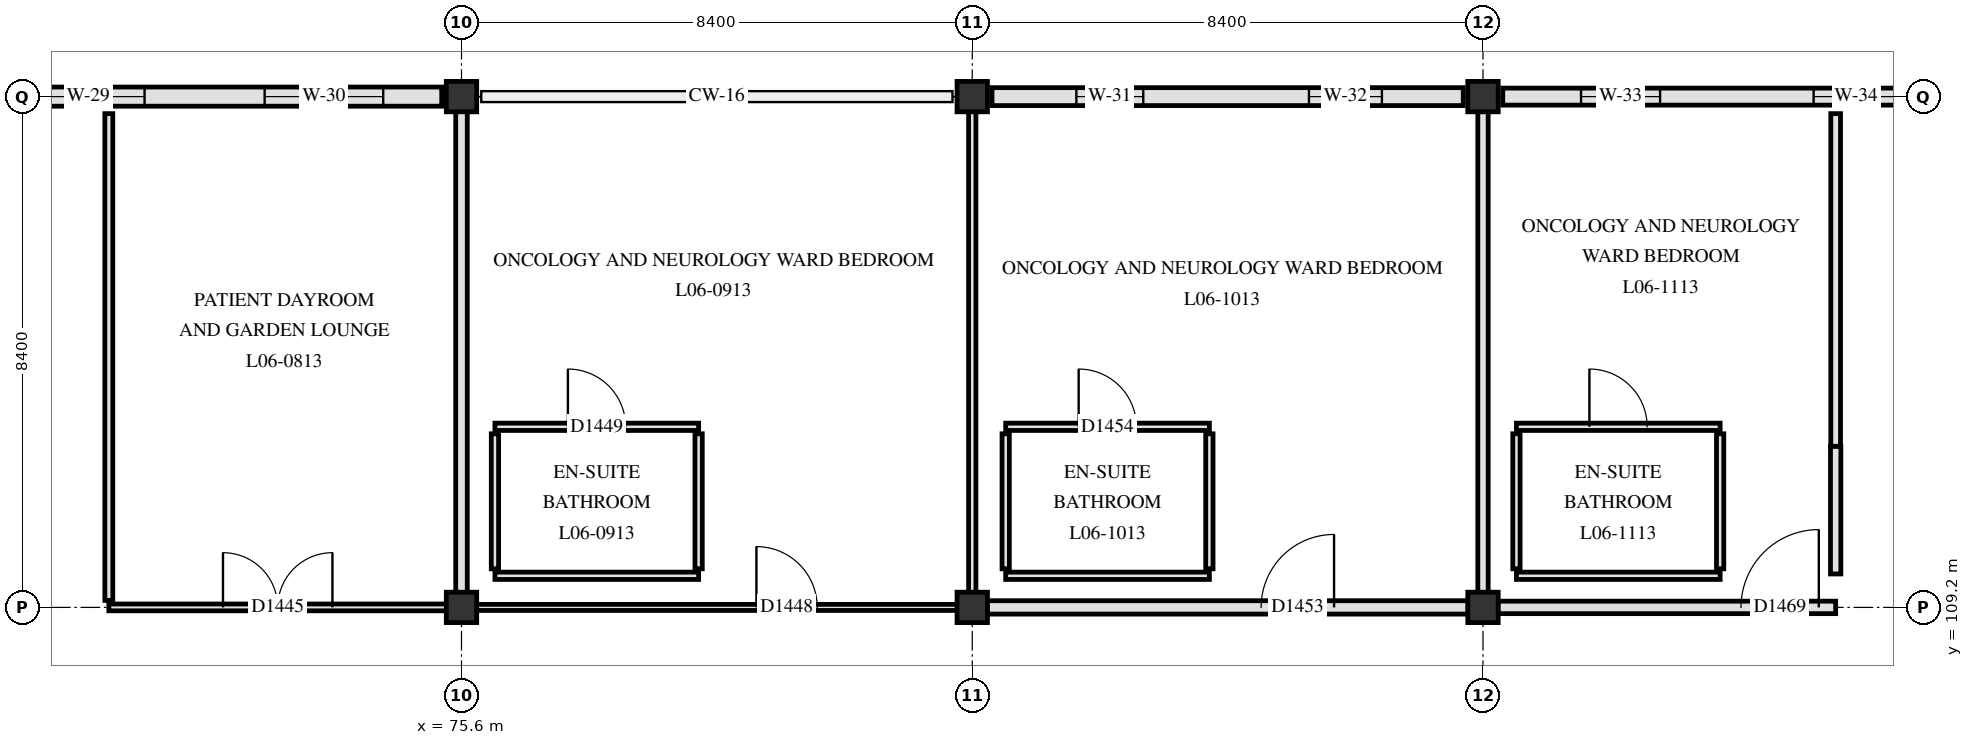
"""IFC4 building model, lengths in metres.
Left out: names, types, materials, properties, quantities, classifications, styles, units other than length and angle.
Written with IfcOpenShell. Run it as: python <this file> out.ifc"""

import sys

from ifc_helpers import new_model, si_unit, direction, frame, frame_2d, origin, origin_2d, place, context, subcontext, project, spatial, rectangle, extrude, element, fill, save


model = new_model("IFC4")
c1 = context("Model", 3, precision=1e-05, world=origin(), true_north=direction((0.0, 1.0)))
c2 = subcontext(c1, "Body", "Model", "MODEL_VIEW")
j1 = project(units=[si_unit("LENGTHUNIT", "METRE"), si_unit("PLANEANGLEUNIT", "RADIAN")], contexts=[c1])
p1 = place(None, origin())
s1 = spatial("IfcSite", under=j1, at=p1, CompositionType="ELEMENT")
p2 = place(p1, origin())
s2 = spatial("IfcBuilding", under=s1, at=p2, CompositionType="ELEMENT")
p3 = place(p2, frame((0.0, 0.0, 26.4)))
s3 = spatial("IfcBuildingStorey", under=s2, at=p3, CompositionType="ELEMENT", Elevation=26.4)
for number, where, z_axis, x_axis in (
    (1, (75.6, 109.2, 0.0), (0.0, 0.0, 1.0), (1.0, 0.0, 0.0)),
    (2, (75.6, 117.6, 0.0), (0.0, 0.0, 1.0), (1.0, 0.0, 0.0)),
    (3, (84.0, 109.2, 0.0), (0.0, 0.0, 1.0), (1.0, 0.0, 0.0)),
    (4, (84.0, 117.6, 0.0), (0.0, 0.0, 1.0), (1.0, 0.0, 0.0)),
    (5, (92.4, 109.2, 0.0), (0.0, 0.0, 1.0), (1.0, 0.0, 0.0)),
    (6, (92.4, 117.6, 0.0), (0.0, 0.0, 1.0), (1.0, 0.0, 0.0)),
):
    element("IfcColumn", number, at=place(p3, frame(where, z_axis=z_axis, x_axis=x_axis)), inside=s3, PredefinedType="COLUMN", context=c2, shape_type="SweptSolid", body=[
        extrude(rectangle(XDim=0.5, YDim=0.5, at=origin_2d()), origin(), (0.0, 0.0, 1.0), 3.9),
    ])
p4 = place(p3, frame((67.525, 117.6, 0.0), z_axis=(0.0, 0.0, 1.0), x_axis=(1.0, 0.0, 0.0)))
e7 = element("IfcWall", 7, at=p4, inside=s3, PredefinedType="SOLIDWALL", context=c2, shape_type="SweptSolid", body=[
    extrude(rectangle(XDim=7.75, YDim=0.315, at=frame_2d((3.875, 0.0))), origin(), (0.0, 0.0, 1.0), 3.36),
])
p5 = place(p4, frame((1.012, 0.0, 0.85)))
e8 = element("IfcOpeningElement", 8, at=p5, cuts=e7, PredefinedType="OPENING", context=c2, shape_type="SweptSolid", body=[
    extrude(rectangle(XDim=1.85, YDim=1.54, at=frame_2d((0.925, 0.77))), frame((0.0, 0.167, 0.0), z_axis=(0.0, -1.0, 0.0), x_axis=(1.0, 0.0, 0.0)), (0.0, 0.0, 1.0), 0.335),
])
p6 = place(p4, frame((4.837, 0.0, 0.85)))
e9 = element("IfcOpeningElement", 9, at=p6, cuts=e7, PredefinedType="OPENING", context=c2, shape_type="SweptSolid", body=[
    extrude(rectangle(XDim=1.95, YDim=1.54, at=frame_2d((0.975, 0.77))), frame((0.0, 0.167, 0.0), z_axis=(0.0, -1.0, 0.0), x_axis=(1.0, 0.0, 0.0)), (0.0, 0.0, 1.0), 0.335),
])
p7 = place(p3, frame((84.325, 117.6, 0.0), z_axis=(0.0, 0.0, 1.0), x_axis=(1.0, 0.0, 0.0)))
e10 = element("IfcWall", 10, at=p7, inside=s3, PredefinedType="SOLIDWALL", context=c2, shape_type="SweptSolid", body=[
    extrude(rectangle(XDim=7.75, YDim=0.295, at=frame_2d((3.875, 0.0))), origin(), (0.0, 0.0, 1.0), 3.36),
])
p8 = place(p7, frame((1.387, 0.0, 0.85)))
e11 = element("IfcOpeningElement", 11, at=p8, cuts=e10, PredefinedType="OPENING", context=c2, shape_type="SweptSolid", body=[
    extrude(rectangle(XDim=1.1, YDim=1.66, at=frame_2d((0.55, 0.83))), frame((0.0, 0.157, 0.0), z_axis=(0.0, -1.0, 0.0), x_axis=(1.0, 0.0, 0.0)), (0.0, 0.0, 1.0), 0.315),
])
p9 = place(p7, frame((5.212, 0.0, 0.85)))
e12 = element("IfcOpeningElement", 12, at=p9, cuts=e10, PredefinedType="OPENING", context=c2, shape_type="SweptSolid", body=[
    extrude(rectangle(XDim=1.2, YDim=1.66, at=frame_2d((0.6, 0.83))), frame((0.0, 0.157, 0.0), z_axis=(0.0, -1.0, 0.0), x_axis=(1.0, 0.0, 0.0)), (0.0, 0.0, 1.0), 0.315),
])
p10 = place(p3, frame((92.725, 117.6, 0.0), z_axis=(0.0, 0.0, 1.0), x_axis=(1.0, 0.0, 0.0)))
e13 = element("IfcWall", 13, at=p10, inside=s3, PredefinedType="SOLIDWALL", context=c2, shape_type="SweptSolid", body=[
    extrude(rectangle(XDim=7.75, YDim=0.28, at=frame_2d((3.875, 0.0))), origin(), (0.0, 0.0, 1.0), 3.36),
])
p11 = place(p10, frame((1.288, 0.0, 0.85)))
e14 = element("IfcOpeningElement", 14, at=p11, cuts=e13, PredefinedType="OPENING", context=c2, shape_type="SweptSolid", body=[
    extrude(rectangle(XDim=1.3, YDim=1.66, at=frame_2d((0.65, 0.83))), frame((0.0, 0.15, 0.0), z_axis=(0.0, -1.0, 0.0), x_axis=(1.0, 0.0, 0.0)), (0.0, 0.0, 1.0), 0.3),
])
p12 = place(p10, frame((5.113, 0.0, 0.85)))
e15 = element("IfcOpeningElement", 15, at=p12, cuts=e13, PredefinedType="OPENING", context=c2, shape_type="SweptSolid", body=[
    extrude(rectangle(XDim=1.4, YDim=1.66, at=frame_2d((0.7, 0.83))), frame((0.0, 0.15, 0.0), z_axis=(0.0, -1.0, 0.0), x_axis=(1.0, 0.0, 0.0)), (0.0, 0.0, 1.0), 0.3),
])
p13 = place(p3, frame((69.8, 109.2, 0.0), z_axis=(0.0, 0.0, 1.0), x_axis=(1.0, 0.0, 0.0)))
e16 = element("IfcWall", 16, at=p13, inside=s3, PredefinedType="PARTITIONING", context=c2, shape_type="SweptSolid", body=[
    extrude(rectangle(XDim=5.555, YDim=0.112, at=frame_2d((2.777, 0.0))), origin(), (0.0, 0.0, 1.0), 3.21),
])
p14 = place(p13, frame((1.877, 0.0, 0.0)))
e17 = element("IfcOpeningElement", 17, at=p14, cuts=e16, PredefinedType="OPENING", context=c2, shape_type="SweptSolid", body=[
    extrude(rectangle(XDim=1.8, YDim=2.25, at=frame_2d((0.9, 1.125))), frame((0.0, 0.066, 0.0), z_axis=(0.0, -1.0, 0.0), x_axis=(1.0, 0.0, 0.0)), (0.0, 0.0, 1.0), 0.132),
])
p15 = place(p3, frame((75.845, 109.2, 0.0), z_axis=(0.0, 0.0, 1.0), x_axis=(1.0, 0.0, 0.0)))
e18 = element("IfcWall", 18, at=p15, inside=s3, PredefinedType="PARTITIONING", context=c2, shape_type="SweptSolid", body=[
    extrude(rectangle(XDim=7.91, YDim=0.1, at=frame_2d((3.955, 0.0))), origin(), (0.0, 0.0, 1.0), 3.21),
])
p16 = place(p15, frame((4.605, 0.0, 0.0)))
e19 = element("IfcOpeningElement", 19, at=p16, cuts=e18, PredefinedType="OPENING", context=c2, shape_type="SweptSolid", body=[
    extrude(rectangle(XDim=1.0, YDim=2.15, at=frame_2d((0.5, 1.075))), frame((0.0, 0.06, 0.0), z_axis=(0.0, -1.0, 0.0), x_axis=(1.0, 0.0, 0.0)), (0.0, 0.0, 1.0), 0.12),
])
p17 = place(p3, frame((84.245, 109.2, 0.0), z_axis=(0.0, 0.0, 1.0), x_axis=(1.0, 0.0, 0.0)))
e20 = element("IfcWall", 20, at=p17, inside=s3, PredefinedType="PARTITIONING", context=c2, shape_type="SweptSolid", body=[
    extrude(rectangle(XDim=7.91, YDim=0.22, at=frame_2d((3.955, 0.0))), origin(), (0.0, 0.0, 1.0), 3.21),
])
p18 = place(p17, frame((4.506, 0.0, 0.0)))
e21 = element("IfcOpeningElement", 21, at=p18, cuts=e20, PredefinedType="OPENING", context=c2, shape_type="SweptSolid", body=[
    extrude(rectangle(XDim=1.2, YDim=2.15, at=frame_2d((0.6, 1.075))), frame((0.0, 0.12, 0.0), z_axis=(0.0, -1.0, 0.0), x_axis=(1.0, 0.0, 0.0)), (0.0, 0.0, 1.0), 0.24),
])
p19 = place(p3, frame((92.645, 109.2, 0.0), z_axis=(0.0, 0.0, 1.0), x_axis=(1.0, 0.0, 0.0)))
e22 = element("IfcWall", 22, at=p19, inside=s3, PredefinedType="PARTITIONING", context=c2, shape_type="SweptSolid", body=[
    extrude(rectangle(XDim=5.555, YDim=0.205, at=frame_2d((2.777, 0.0))), origin(), (0.0, 0.0, 1.0), 3.21),
])
p20 = place(p19, frame((3.998, 0.0, 0.0)))
e23 = element("IfcOpeningElement", 23, at=p20, cuts=e22, PredefinedType="OPENING", context=c2, shape_type="SweptSolid", body=[
    extrude(rectangle(XDim=1.28, YDim=2.18, at=frame_2d((0.64, 1.09))), frame((0.0, 0.113, 0.0), z_axis=(0.0, -1.0, 0.0), x_axis=(1.0, 0.0, 0.0)), (0.0, 0.0, 1.0), 0.225),
])
p21 = place(p3, frame((76.15, 109.72, 0.0), z_axis=(0.0, 0.0, 1.0), x_axis=(1.0, 0.0, 0.0)))
e24 = element("IfcWall", 24, at=p21, inside=s3, PredefinedType="PARTITIONING", context=c2, shape_type="SweptSolid", body=[
    extrude(rectangle(XDim=3.35, YDim=0.12, at=frame_2d((1.675, 0.0))), origin(), (0.0, 0.0, 1.0), 3.61),
])
p22 = place(p3, frame((84.55, 109.72, 0.0), z_axis=(0.0, 0.0, 1.0), x_axis=(1.0, 0.0, 0.0)))
e25 = element("IfcWall", 25, at=p22, inside=s3, PredefinedType="PARTITIONING", context=c2, shape_type="SweptSolid", body=[
    extrude(rectangle(XDim=3.35, YDim=0.12, at=frame_2d((1.675, 0.0))), origin(), (0.0, 0.0, 1.0), 3.61),
])
p23 = place(p3, frame((92.95, 109.72, 0.0), z_axis=(0.0, 0.0, 1.0), x_axis=(1.0, 0.0, 0.0)))
e26 = element("IfcWall", 26, at=p23, inside=s3, PredefinedType="PARTITIONING", context=c2, shape_type="SweptSolid", body=[
    extrude(rectangle(XDim=3.35, YDim=0.12, at=frame_2d((1.675, 0.0))), origin(), (0.0, 0.0, 1.0), 3.61),
])
p24 = place(p3, frame((76.15, 112.17, 0.0), z_axis=(0.0, 0.0, 1.0), x_axis=(1.0, 0.0, 0.0)))
e27 = element("IfcWall", 27, at=p24, inside=s3, PredefinedType="PARTITIONING", context=c2, shape_type="SweptSolid", body=[
    extrude(rectangle(XDim=3.35, YDim=0.12, at=frame_2d((1.675, 0.0))), origin(), (0.0, 0.0, 1.0), 3.61),
])
p25 = place(p24, frame((1.2, 0.0, 0.0)))
e28 = element("IfcOpeningElement", 28, at=p25, cuts=e27, PredefinedType="OPENING", context=c2, shape_type="SweptSolid", body=[
    extrude(rectangle(XDim=0.95, YDim=2.1, at=frame_2d((0.475, 1.05))), frame((0.0, 0.07, 0.0), z_axis=(0.0, -1.0, 0.0), x_axis=(1.0, 0.0, 0.0)), (0.0, 0.0, 1.0), 0.14),
])
p26 = place(p3, frame((84.55, 112.17, 0.0), z_axis=(0.0, 0.0, 1.0), x_axis=(1.0, 0.0, 0.0)))
e29 = element("IfcWall", 29, at=p26, inside=s3, PredefinedType="PARTITIONING", context=c2, shape_type="SweptSolid", body=[
    extrude(rectangle(XDim=3.35, YDim=0.12, at=frame_2d((1.675, 0.0))), origin(), (0.0, 0.0, 1.0), 3.61),
])
p27 = place(p26, frame((1.2, 0.0, 0.0)))
e30 = element("IfcOpeningElement", 30, at=p27, cuts=e29, PredefinedType="OPENING", context=c2, shape_type="SweptSolid", body=[
    extrude(rectangle(XDim=0.95, YDim=2.1, at=frame_2d((0.475, 1.05))), frame((0.0, 0.07, 0.0), z_axis=(0.0, -1.0, 0.0), x_axis=(1.0, 0.0, 0.0)), (0.0, 0.0, 1.0), 0.14),
])
p28 = place(p3, frame((92.95, 112.17, 0.0), z_axis=(0.0, 0.0, 1.0), x_axis=(1.0, 0.0, 0.0)))
e31 = element("IfcWall", 31, at=p28, inside=s3, PredefinedType="PARTITIONING", context=c2, shape_type="SweptSolid", body=[
    extrude(rectangle(XDim=3.35, YDim=0.12, at=frame_2d((1.675, 0.0))), origin(), (0.0, 0.0, 1.0), 3.61),
])
p29 = place(p28, frame((1.2, 0.0, 0.0)))
e32 = element("IfcOpeningElement", 32, at=p29, cuts=e31, PredefinedType="OPENING", context=c2, shape_type="SweptSolid", body=[
    extrude(rectangle(XDim=0.95, YDim=2.1, at=frame_2d((0.475, 1.05))), frame((0.0, 0.07, 0.0), z_axis=(0.0, -1.0, 0.0), x_axis=(1.0, 0.0, 0.0)), (0.0, 0.0, 1.0), 0.14),
])
p30 = place(p3, frame((69.8, 109.315, 0.0), z_axis=(0.0, 0.0, 1.0), x_axis=(0.0, 1.0, 0.0)))
e33 = element("IfcWall", 33, at=p30, inside=s3, PredefinedType="PARTITIONING", context=c2, shape_type="SweptSolid", body=[
    extrude(rectangle(XDim=8.005, YDim=0.13, at=frame_2d((4.002, 0.0))), origin(), (0.0, 0.0, 1.0), 3.34),
])
p31 = place(p3, frame((75.6, 109.445, 0.0), z_axis=(0.0, 0.0, 1.0), x_axis=(0.0, 1.0, 0.0)))
e34 = element("IfcWall", 34, at=p31, inside=s3, PredefinedType="PARTITIONING", context=c2, shape_type="SweptSolid", body=[
    extrude(rectangle(XDim=7.91, YDim=0.19, at=frame_2d((3.955, 0.0))), origin(), (0.0, 0.0, 1.0), 3.21),
])
for number, where, z_axis, x_axis in (
    (35, (76.15, 109.835, 0.0), (0.0, 0.0, 1.0), (0.0, 1.0, 0.0)),
    (36, (79.5, 109.835, 0.0), (0.0, 0.0, 1.0), (0.0, 1.0, 0.0)),
):
    element("IfcWall", number, at=place(p3, frame(where, z_axis=z_axis, x_axis=x_axis)), inside=s3, PredefinedType="PARTITIONING", context=c2, shape_type="SweptSolid", body=[
        extrude(rectangle(XDim=2.22, YDim=0.12, at=frame_2d((1.11, 0.0))), origin(), (0.0, 0.0, 1.0), 3.34),
    ])
p32 = place(p3, frame((84.0, 109.445, 0.0), z_axis=(0.0, 0.0, 1.0), x_axis=(0.0, 1.0, 0.0)))
e37 = element("IfcWall", 37, at=p32, inside=s3, PredefinedType="PARTITIONING", context=c2, shape_type="SweptSolid", body=[
    extrude(rectangle(XDim=7.91, YDim=0.12, at=frame_2d((3.955, 0.0))), origin(), (0.0, 0.0, 1.0), 3.21),
])
for number, where, z_axis, x_axis in (
    (38, (84.55, 109.835, 0.0), (0.0, 0.0, 1.0), (0.0, 1.0, 0.0)),
    (39, (87.9, 109.835, 0.0), (0.0, 0.0, 1.0), (0.0, 1.0, 0.0)),
):
    element("IfcWall", number, at=place(p3, frame(where, z_axis=z_axis, x_axis=x_axis)), inside=s3, PredefinedType="PARTITIONING", context=c2, shape_type="SweptSolid", body=[
        extrude(rectangle(XDim=2.22, YDim=0.12, at=frame_2d((1.11, 0.0))), origin(), (0.0, 0.0, 1.0), 3.34),
    ])
p33 = place(p3, frame((92.4, 109.445, 0.0), z_axis=(0.0, 0.0, 1.0), x_axis=(0.0, 1.0, 0.0)))
e40 = element("IfcWall", 40, at=p33, inside=s3, PredefinedType="PARTITIONING", context=c2, shape_type="SweptSolid", body=[
    extrude(rectangle(XDim=7.91, YDim=0.17, at=frame_2d((3.955, 0.0))), origin(), (0.0, 0.0, 1.0), 3.21),
])
for number, where, z_axis, x_axis in (
    (41, (92.95, 109.835, 0.0), (0.0, 0.0, 1.0), (0.0, 1.0, 0.0)),
    (42, (96.3, 109.835, 0.0), (0.0, 0.0, 1.0), (0.0, 1.0, 0.0)),
):
    element("IfcWall", number, at=place(p3, frame(where, z_axis=z_axis, x_axis=x_axis)), inside=s3, PredefinedType="PARTITIONING", context=c2, shape_type="SweptSolid", body=[
        extrude(rectangle(XDim=2.22, YDim=0.12, at=frame_2d((1.11, 0.0))), origin(), (0.0, 0.0, 1.0), 3.34),
    ])
p34 = place(p3, frame((98.2, 109.75, 0.0), z_axis=(0.0, 0.0, 1.0), x_axis=(0.0, 1.0, 0.0)))
e43 = element("IfcWall", 43, at=p34, inside=s3, PredefinedType="PARTITIONING", context=c2, shape_type="SweptSolid", body=[
    extrude(rectangle(XDim=2.1, YDim=0.17, at=frame_2d((1.05, 0.0))), origin(), (0.0, 0.0, 1.0), 3.61),
])
p35 = place(p3, frame((98.2, 111.85, 0.0), z_axis=(0.0, 0.0, 1.0), x_axis=(0.0, 1.0, 0.0)))
e44 = element("IfcWall", 44, at=p35, inside=s3, PredefinedType="PARTITIONING", context=c2, shape_type="SweptSolid", body=[
    extrude(rectangle(XDim=5.47, YDim=0.16, at=frame_2d((2.735, 0.0))), origin(), (0.0, 0.0, 1.0), 3.34),
])
p36 = place(p5, origin())
e45 = element("IfcWindow", 45, at=p36, inside=s3, PartitioningType="SINGLE_PANEL", PredefinedType="WINDOW", context=c2, shape_type="SweptSolid", body=[
    extrude(rectangle(XDim=1.85, YDim=1.54, at=frame_2d((0.925, 0.77))), frame((0.0, 0.03, 0.0), z_axis=(0.0, -1.0, 0.0), x_axis=(1.0, 0.0, 0.0)), (0.0, 0.0, 1.0), 0.06),
])
fill(e8, e45)
p37 = place(p6, origin())
e46 = element("IfcWindow", 46, at=p37, inside=s3, PartitioningType="SINGLE_PANEL", PredefinedType="WINDOW", context=c2, shape_type="SweptSolid", body=[
    extrude(rectangle(XDim=1.95, YDim=1.54, at=frame_2d((0.975, 0.77))), frame((0.0, 0.03, 0.0), z_axis=(0.0, -1.0, 0.0), x_axis=(1.0, 0.0, 0.0)), (0.0, 0.0, 1.0), 0.06),
])
fill(e9, e46)
p38 = place(p8, origin())
e47 = element("IfcWindow", 47, at=p38, inside=s3, PartitioningType="SINGLE_PANEL", PredefinedType="WINDOW", context=c2, shape_type="SweptSolid", body=[
    extrude(rectangle(XDim=1.1, YDim=1.66, at=frame_2d((0.55, 0.83))), frame((0.0, 0.03, 0.0), z_axis=(0.0, -1.0, 0.0), x_axis=(1.0, 0.0, 0.0)), (0.0, 0.0, 1.0), 0.06),
])
fill(e11, e47)
p39 = place(p9, origin())
e48 = element("IfcWindow", 48, at=p39, inside=s3, PartitioningType="SINGLE_PANEL", PredefinedType="WINDOW", context=c2, shape_type="SweptSolid", body=[
    extrude(rectangle(XDim=1.2, YDim=1.66, at=frame_2d((0.6, 0.83))), frame((0.0, 0.03, 0.0), z_axis=(0.0, -1.0, 0.0), x_axis=(1.0, 0.0, 0.0)), (0.0, 0.0, 1.0), 0.06),
])
fill(e12, e48)
p40 = place(p11, origin())
e49 = element("IfcWindow", 49, at=p40, inside=s3, PartitioningType="SINGLE_PANEL", PredefinedType="WINDOW", context=c2, shape_type="SweptSolid", body=[
    extrude(rectangle(XDim=1.3, YDim=1.66, at=frame_2d((0.65, 0.83))), frame((0.0, 0.03, 0.0), z_axis=(0.0, -1.0, 0.0), x_axis=(1.0, 0.0, 0.0)), (0.0, 0.0, 1.0), 0.06),
])
fill(e14, e49)
p41 = place(p12, origin())
e50 = element("IfcWindow", 50, at=p41, inside=s3, PartitioningType="SINGLE_PANEL", PredefinedType="WINDOW", context=c2, shape_type="SweptSolid", body=[
    extrude(rectangle(XDim=1.4, YDim=1.66, at=frame_2d((0.7, 0.83))), frame((0.0, 0.03, 0.0), z_axis=(0.0, -1.0, 0.0), x_axis=(1.0, 0.0, 0.0)), (0.0, 0.0, 1.0), 0.06),
])
fill(e15, e50)
p42 = place(p14, origin())
e51 = element("IfcDoor", 51, at=p42, inside=s3, OperationType="DOUBLE_SWING_RIGHT", PredefinedType="DOOR", context=c2, shape_type="SweptSolid", body=[
    extrude(rectangle(XDim=1.8, YDim=2.25, at=frame_2d((0.9, 1.125))), frame((0.0, 0.025, 0.0), z_axis=(0.0, -1.0, 0.0), x_axis=(1.0, 0.0, 0.0)), (0.0, 0.0, 1.0), 0.05),
])
fill(e17, e51)
p43 = place(p16, origin())
e52 = element("IfcDoor", 52, at=p43, inside=s3, OperationType="SINGLE_SWING_LEFT", PredefinedType="DOOR", context=c2, shape_type="SweptSolid", body=[
    extrude(rectangle(XDim=1.0, YDim=2.15, at=frame_2d((0.5, 1.075))), frame((0.0, 0.025, 0.0), z_axis=(0.0, -1.0, 0.0), x_axis=(1.0, 0.0, 0.0)), (0.0, 0.0, 1.0), 0.05),
])
fill(e19, e52)
p44 = place(p25, origin())
e53 = element("IfcDoor", 53, at=p44, inside=s3, OperationType="SINGLE_SWING_LEFT", PredefinedType="DOOR", context=c2, shape_type="SweptSolid", body=[
    extrude(rectangle(XDim=0.95, YDim=2.1, at=frame_2d((0.475, 1.05))), frame((0.0, 0.025, 0.0), z_axis=(0.0, -1.0, 0.0), x_axis=(1.0, 0.0, 0.0)), (0.0, 0.0, 1.0), 0.05),
])
fill(e28, e53)
p45 = place(p18, origin())
e54 = element("IfcDoor", 54, at=p45, inside=s3, OperationType="SINGLE_SWING_RIGHT", PredefinedType="DOOR", context=c2, shape_type="SweptSolid", body=[
    extrude(rectangle(XDim=1.2, YDim=2.15, at=frame_2d((0.6, 1.075))), frame((0.0, 0.025, 0.0), z_axis=(0.0, -1.0, 0.0), x_axis=(1.0, 0.0, 0.0)), (0.0, 0.0, 1.0), 0.05),
])
fill(e21, e54)
p46 = place(p27, origin())
e55 = element("IfcDoor", 55, at=p46, inside=s3, OperationType="SINGLE_SWING_LEFT", PredefinedType="DOOR", context=c2, shape_type="SweptSolid", body=[
    extrude(rectangle(XDim=0.95, YDim=2.1, at=frame_2d((0.475, 1.05))), frame((0.0, 0.025, 0.0), z_axis=(0.0, -1.0, 0.0), x_axis=(1.0, 0.0, 0.0)), (0.0, 0.0, 1.0), 0.05),
])
fill(e30, e55)
p47 = place(p20, origin())
e56 = element("IfcDoor", 56, at=p47, inside=s3, OperationType="SINGLE_SWING_RIGHT", PredefinedType="DOOR", context=c2, shape_type="SweptSolid", body=[
    extrude(rectangle(XDim=1.28, YDim=2.18, at=frame_2d((0.64, 1.09))), frame((0.0, 0.025, 0.0), z_axis=(0.0, -1.0, 0.0), x_axis=(1.0, 0.0, 0.0)), (0.0, 0.0, 1.0), 0.05),
])
fill(e23, e56)
p48 = place(p29, origin())
e57 = element("IfcDoor", 57, at=p48, inside=s3, OperationType="SINGLE_SWING_LEFT", PredefinedType="DOOR", context=c2, shape_type="SweptSolid", body=[
    extrude(rectangle(XDim=0.95, YDim=2.1, at=frame_2d((0.475, 1.05))), frame((0.0, 0.025, 0.0), z_axis=(0.0, -1.0, 0.0), x_axis=(1.0, 0.0, 0.0)), (0.0, 0.0, 1.0), 0.05),
])
fill(e32, e57)
save(model, sys.argv[1])
